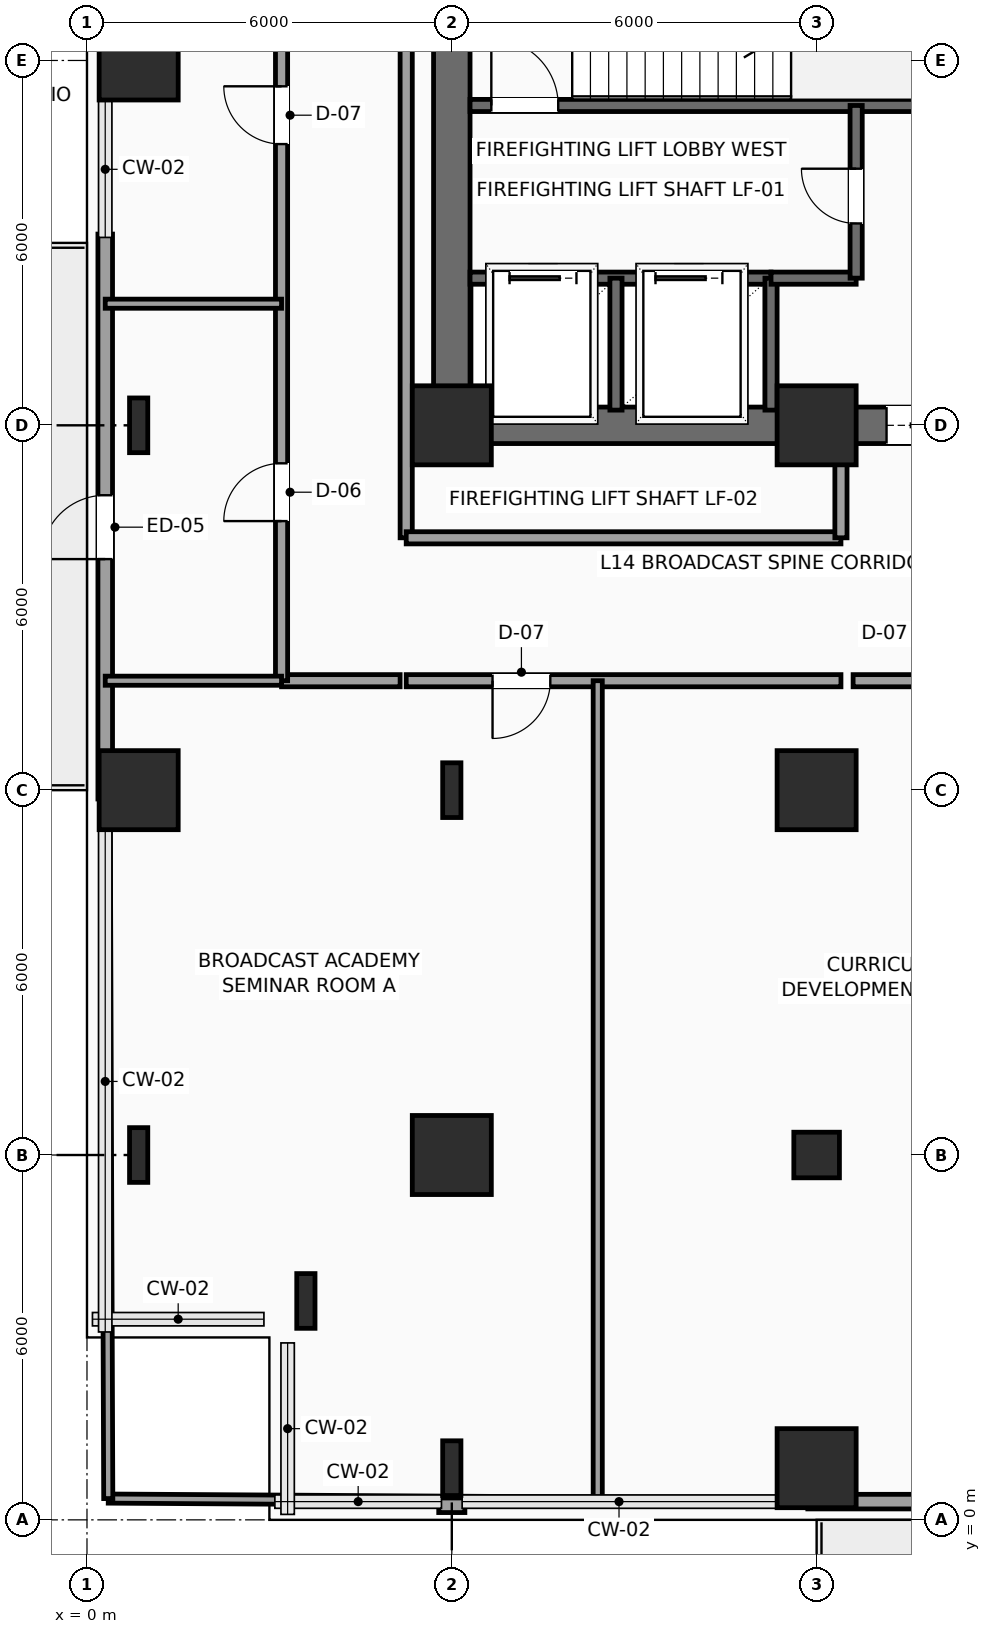
"""IFC4 building model, lengths in metres.
Left out: names, types, materials, properties, quantities, classifications, styles, units other than length and angle.
Written with IfcOpenShell. Run it as: python <this file> out.ifc"""

import sys

from ifc_helpers import new_model, si_unit, direction, frame, frame_2d, origin, origin_2d, place, context, subcontext, project, spatial, rectangle, hollow_rectangle, i_section, extrude, element, fill, save


model = new_model("IFC4")
c1 = context("Model", 3, precision=1e-05, world=origin(), true_north=direction((0.0, 1.0)))
c2 = subcontext(c1, "Body", "Model", "MODEL_VIEW")
j1 = project(units=[si_unit("LENGTHUNIT", "METRE"), si_unit("PLANEANGLEUNIT", "RADIAN")], contexts=[c1])
p1 = place(None, origin())
s1 = spatial("IfcSite", under=j1, at=p1, CompositionType="ELEMENT")
p2 = place(p1, origin())
s2 = spatial("IfcBuilding", under=s1, at=p2, CompositionType="ELEMENT")
p3 = place(p2, frame((0.0, 0.0, 63.6)))
s3 = spatial("IfcBuildingStorey", under=s2, at=p3, CompositionType="ELEMENT", Elevation=63.6)
for number, where, z_axis, x_axis in (
    (1, (6.0, 18.0, 0.0), (0.0, 0.0, 1.0), (1.0, 0.0, 0.0)),
    (2, (12.0, 18.0, 0.0), (0.0, 0.0, 1.0), (1.0, 0.0, 0.0)),
):
    element("IfcColumn", number, at=place(p3, frame(where, z_axis=z_axis, x_axis=x_axis)), inside=s3, PredefinedType="COLUMN", context=c2, shape_type="SweptSolid", body=[
        extrude(rectangle(XDim=1.3, YDim=1.3, at=origin_2d()), origin(), (0.0, 0.0, 1.0), 3.9),
    ])
for number, where, z_axis, x_axis in (
    (3, (3.6, 3.6, 0.0), (0.0, 0.0, 1.0), (1.0, 0.0, 0.0)),
    (4, (0.85, 6.0, 0.0), (0.0, 0.0, 1.0), (1.0, 0.0, 0.0)),
):
    element("IfcColumn", number, at=place(p3, frame(where, z_axis=z_axis, x_axis=x_axis)), inside=s3, PredefinedType="COLUMN", context=c2, shape_type="SweptSolid", body=[
        extrude(i_section(OverallWidth=0.3, OverallDepth=0.9, WebThickness=0.019, FlangeThickness=0.035, FilletRadius=0.03, at=origin_2d()), origin(), (0.0, 0.0, 1.0), 3.9),
    ])
p4 = place(p3, frame((0.85, 12.0, 0.0), z_axis=(0.0, 0.0, 1.0), x_axis=(1.0, 0.0, 0.0)))
e5 = element("IfcColumn", 5, at=p4, inside=s3, PredefinedType="COLUMN", context=c2, shape_type="SweptSolid", body=[
    extrude(rectangle(XDim=1.3, YDim=1.3, at=origin_2d()), origin(), (0.0, 0.0, 1.0), 3.9),
])
p5 = place(p3, frame((0.85, 18.0, 0.0), z_axis=(0.0, 0.0, 1.0), x_axis=(1.0, 0.0, 0.0)))
e6 = element("IfcColumn", 6, at=p5, inside=s3, PredefinedType="COLUMN", context=c2, shape_type="SweptSolid", body=[
    extrude(i_section(OverallWidth=0.3, OverallDepth=0.9, WebThickness=0.019, FlangeThickness=0.035, FilletRadius=0.03, at=origin_2d()), origin(), (0.0, 0.0, 1.0), 3.9),
])
p6 = place(p3, frame((0.85, 24.0, 0.0), z_axis=(0.0, 0.0, 1.0), x_axis=(1.0, 0.0, 0.0)))
e7 = element("IfcColumn", 7, at=p6, inside=s3, PredefinedType="COLUMN", context=c2, shape_type="SweptSolid", body=[
    extrude(rectangle(XDim=1.3, YDim=1.3, at=origin_2d()), origin(), (0.0, 0.0, 1.0), 3.9),
])
p7 = place(p3, frame((6.0, 0.85, 0.0), z_axis=(0.0, 0.0, 1.0), x_axis=(1.0, 0.0, 0.0)))
e8 = element("IfcColumn", 8, at=p7, inside=s3, PredefinedType="COLUMN", context=c2, shape_type="SweptSolid", body=[
    extrude(i_section(OverallWidth=0.3, OverallDepth=0.9, WebThickness=0.019, FlangeThickness=0.035, FilletRadius=0.03, at=origin_2d()), origin(), (0.0, 0.0, 1.0), 3.9),
])
p8 = place(p3, frame((6.0, 6.0, 0.0), z_axis=(0.0, 0.0, 1.0), x_axis=(1.0, 0.0, 0.0)))
e9 = element("IfcColumn", 9, at=p8, inside=s3, PredefinedType="COLUMN", context=c2, shape_type="SweptSolid", body=[
    extrude(rectangle(XDim=1.3, YDim=1.3, at=origin_2d()), origin(), (0.0, 0.0, 1.0), 3.9),
])
p9 = place(p3, frame((6.0, 12.0, 0.0), z_axis=(0.0, 0.0, 1.0), x_axis=(1.0, 0.0, 0.0)))
e10 = element("IfcColumn", 10, at=p9, inside=s3, PredefinedType="COLUMN", context=c2, shape_type="SweptSolid", body=[
    extrude(i_section(OverallWidth=0.3, OverallDepth=0.9, WebThickness=0.019, FlangeThickness=0.035, FilletRadius=0.03, at=origin_2d()), origin(), (0.0, 0.0, 1.0), 3.9),
])
p10 = place(p3, frame((12.0, 0.85, 0.0), z_axis=(0.0, 0.0, 1.0), x_axis=(1.0, 0.0, 0.0)))
e11 = element("IfcColumn", 11, at=p10, inside=s3, PredefinedType="COLUMN", context=c2, shape_type="SweptSolid", body=[
    extrude(rectangle(XDim=1.3, YDim=1.3, at=origin_2d()), origin(), (0.0, 0.0, 1.0), 3.9),
])
p11 = place(p3, frame((12.0, 6.0, 0.0), z_axis=(0.0, 0.0, 1.0), x_axis=(1.0, 0.0, 0.0)))
e12 = element("IfcColumn", 12, at=p11, inside=s3, PredefinedType="COLUMN", context=c2, shape_type="SweptSolid", body=[
    extrude(hollow_rectangle(XDim=0.75, YDim=0.75, WallThickness=0.035, InnerFilletRadius=0.035, OuterFilletRadius=0.05, at=origin_2d()), origin(), (0.0, 0.0, 1.0), 3.9),
])
p12 = place(p3, frame((12.0, 12.0, 0.0), z_axis=(0.0, 0.0, 1.0), x_axis=(1.0, 0.0, 0.0)))
e13 = element("IfcColumn", 13, at=p12, inside=s3, PredefinedType="COLUMN", context=c2, shape_type="SweptSolid", body=[
    extrude(rectangle(XDim=1.3, YDim=1.3, at=origin_2d()), origin(), (0.0, 0.0, 1.0), 3.9),
])
p13 = place(p3, frame((21.145, 0.3, 0.0), z_axis=(0.0, 0.0, 1.0), x_axis=(-1.0, 0.0, 0.0)))
e14 = element("IfcWall", 14, at=p13, inside=s3, PredefinedType="SOLIDWALL", context=c2, shape_type="SweptSolid", body=[
    extrude(rectangle(XDim=9.29, YDim=0.24, at=frame_2d((4.645, 0.0))), origin(), (0.0, 0.0, 1.0), 3.65),
])
p14 = place(p13, frame((5.95, 0.0, 0.0)))
e15 = element("IfcOpeningElement", 15, at=p14, cuts=e14, PredefinedType="OPENING", context=c2, shape_type="SweptSolid", body=[
    extrude(rectangle(XDim=1.05, YDim=2.2, at=frame_2d((0.525, 1.1))), frame((0.0, 0.13, 0.0), z_axis=(0.0, -1.0, 0.0), x_axis=(1.0, 0.0, 0.0)), (0.0, 0.0, 1.0), 0.26),
])
p15 = place(p3, frame((0.3, 11.855, 0.0), z_axis=(0.0, 0.0, 1.0), x_axis=(0.0, 1.0, 0.0)))
e16 = element("IfcWall", 16, at=p15, inside=s3, PredefinedType="SOLIDWALL", context=c2, shape_type="SweptSolid", body=[
    extrude(rectangle(XDim=9.29, YDim=0.24, at=frame_2d((4.645, 0.0))), origin(), (0.0, 0.0, 1.0), 3.65),
])
p16 = place(p15, frame((3.945, 0.0, 0.0)))
e17 = element("IfcOpeningElement", 17, at=p16, cuts=e16, PredefinedType="OPENING", context=c2, shape_type="SweptSolid", body=[
    extrude(rectangle(XDim=1.05, YDim=2.2, at=frame_2d((0.525, 1.1))), frame((0.0, 0.13, 0.0), z_axis=(0.0, -1.0, 0.0), x_axis=(1.0, 0.0, 0.0)), (0.0, 0.0, 1.0), 0.26),
])
p17 = place(p3, frame((6.215, 0.24, 0.0), z_axis=(0.0, 0.0, 1.0), x_axis=(-1.0, 0.0, 0.0)))
e18 = element("IfcWall", 18, at=p17, inside=s3, PredefinedType="SOLIDWALL", context=c2, shape_type="SweptSolid", body=[
    extrude(rectangle(XDim=0.43, YDim=0.24, at=frame_2d((0.215, 0.0))), origin(), (0.0, 0.0, 1.0), 3.65),
])
p18 = place(p3, frame((6.0, 18.0, 0.0), z_axis=(0.0, 0.0, 1.0), x_axis=(1.0, 0.0, 0.0)))
e19 = element("IfcWall", 19, at=p18, inside=s3, PredefinedType="SHEAR", context=c2, shape_type="SweptSolid", body=[
    extrude(rectangle(XDim=12.0, YDim=0.6, at=frame_2d((6.0, 0.0))), origin(), (0.0, 0.0, 1.0), 3.65),
])
p19 = place(p18, frame((7.15, 0.0, 0.0)))
e20 = element("IfcOpeningElement", 20, at=p19, cuts=e19, PredefinedType="OPENING", context=c2, shape_type="SweptSolid", body=[
    extrude(rectangle(XDim=1.6, YDim=2.3, at=frame_2d((0.8, 1.15))), frame((0.0, 0.31, 0.0), z_axis=(0.0, -1.0, 0.0), x_axis=(1.0, 0.0, 0.0)), (0.0, 0.0, 1.0), 0.62),
])
p20 = place(p3, frame((6.0, 18.0, 0.0), z_axis=(0.0, 0.0, 1.0), x_axis=(0.0, 1.0, 0.0)))
e21 = element("IfcWall", 21, at=p20, inside=s3, PredefinedType="SHEAR", context=c2, shape_type="SweptSolid", body=[
    extrude(rectangle(XDim=9.6, YDim=0.6, at=frame_2d((4.8, 0.0))), origin(), (0.0, 0.0, 1.0), 3.65),
])
p21 = place(p3, frame((6.3, 23.26, 0.0), z_axis=(0.0, 0.0, 1.0), x_axis=(1.0, 0.0, 0.0)))
e22 = element("IfcWall", 22, at=p21, inside=s3, PredefinedType="SHEAR", context=c2, shape_type="SweptSolid", body=[
    extrude(rectangle(XDim=8.88, YDim=0.2, at=frame_2d((4.44, 0.0))), origin(), (0.0, 0.0, 1.0), 3.65),
])
p22 = place(p21, frame((0.35, 0.0, 0.0)))
e23 = element("IfcOpeningElement", 23, at=p22, cuts=e22, PredefinedType="OPENING", context=c2, shape_type="SweptSolid", body=[
    extrude(rectangle(XDim=1.1, YDim=2.2, at=frame_2d((0.55, 1.1))), frame((0.0, 0.11, 0.0), z_axis=(0.0, -1.0, 0.0), x_axis=(1.0, 0.0, 0.0)), (0.0, 0.0, 1.0), 0.22),
])
p23 = place(p3, frame((6.3, 20.42, 0.0), z_axis=(0.0, 0.0, 1.0), x_axis=(1.0, 0.0, 0.0)))
e24 = element("IfcWall", 24, at=p23, inside=s3, PredefinedType="SHEAR", context=c2, shape_type="SweptSolid", body=[
    extrude(rectangle(XDim=4.95, YDim=0.2, at=frame_2d((2.475, 0.0))), origin(), (0.0, 0.0, 1.0), 3.65),
])
p24 = place(p23, frame((0.65, 0.0, 0.0)))
e25 = element("IfcOpeningElement", 25, at=p24, cuts=e24, PredefinedType="OPENING", context=c2, shape_type="SweptSolid", body=[
    extrude(rectangle(XDim=1.1, YDim=2.2, at=frame_2d((0.55, 1.1))), frame((0.0, 0.11, 0.0), z_axis=(0.0, -1.0, 0.0), x_axis=(1.0, 0.0, 0.0)), (0.0, 0.0, 1.0), 0.22),
])
p25 = place(p23, frame((3.05, 0.0, 0.0)))
e26 = element("IfcOpeningElement", 26, at=p25, cuts=e24, PredefinedType="OPENING", context=c2, shape_type="SweptSolid", body=[
    extrude(rectangle(XDim=1.1, YDim=2.2, at=frame_2d((0.55, 1.1))), frame((0.0, 0.11, 0.0), z_axis=(0.0, -1.0, 0.0), x_axis=(1.0, 0.0, 0.0)), (0.0, 0.0, 1.0), 0.22),
])
for number, where, z_axis, x_axis in (
    (27, (8.7, 18.25, 0.0), (0.0, 0.0, 1.0), (0.0, 1.0, 0.0)),
    (28, (11.25, 18.25, 0.0), (0.0, 0.0, 1.0), (0.0, 1.0, 0.0)),
):
    element("IfcWall", number, at=place(p3, frame(where, z_axis=z_axis, x_axis=x_axis)), inside=s3, PredefinedType="SHEAR", context=c2, shape_type="SweptSolid", body=[
        extrude(rectangle(XDim=2.17, YDim=0.2, at=frame_2d((1.085, 0.0))), origin(), (0.0, 0.0, 1.0), 3.65),
    ])
p26 = place(p3, frame((11.25, 20.42, 0.0), z_axis=(0.0, 0.0, 1.0), x_axis=(1.0, 0.0, 0.0)))
e29 = element("IfcWall", 29, at=p26, inside=s3, PredefinedType="SHEAR", context=c2, shape_type="SweptSolid", body=[
    extrude(rectangle(XDim=1.4, YDim=0.2, at=frame_2d((0.7, 0.0))), origin(), (0.0, 0.0, 1.0), 3.65),
])
p27 = place(p3, frame((12.65, 20.42, 0.0), z_axis=(0.0, 0.0, 1.0), x_axis=(0.0, 1.0, 0.0)))
e30 = element("IfcWall", 30, at=p27, inside=s3, PredefinedType="SHEAR", context=c2, shape_type="SweptSolid", body=[
    extrude(rectangle(XDim=2.84, YDim=0.2, at=frame_2d((1.42, 0.0))), origin(), (0.0, 0.0, 1.0), 3.65),
])
p28 = place(p27, frame((0.9, 0.0, 0.0)))
e31 = element("IfcOpeningElement", 31, at=p28, cuts=e30, PredefinedType="OPENING", context=c2, shape_type="SweptSolid", body=[
    extrude(rectangle(XDim=0.9, YDim=2.15, at=frame_2d((0.45, 1.075))), frame((0.0, 0.11, 0.0), z_axis=(0.0, -1.0, 0.0), x_axis=(1.0, 0.0, 0.0)), (0.0, 0.0, 1.0), 0.22),
])
p29 = place(p3, frame((21.55, 13.8, 0.0), z_axis=(0.0, 0.0, 1.0), x_axis=(-1.0, 0.0, 0.0)))
e32 = element("IfcWall", 32, at=p29, inside=s3, PredefinedType="SOLIDWALL", context=c2, shape_type="SweptSolid", body=[
    extrude(rectangle(XDim=8.95, YDim=0.2, at=frame_2d((4.475, 0.0))), origin(), (0.0, 0.0, 1.0), 3.65),
])
p30 = place(p29, frame((6.875, 0.0, 0.0)))
e33 = element("IfcOpeningElement", 33, at=p30, cuts=e32, PredefinedType="OPENING", context=c2, shape_type="SweptSolid", body=[
    extrude(rectangle(XDim=0.95, YDim=2.15, at=frame_2d((0.475, 1.075))), frame((0.0, 0.11, 0.0), z_axis=(0.0, -1.0, 0.0), x_axis=(1.0, 0.0, 0.0)), (0.0, 0.0, 1.0), 0.22),
])
p31 = place(p29, frame((1.93, 0.0, 0.0)))
e34 = element("IfcOpeningElement", 34, at=p31, cuts=e32, PredefinedType="OPENING", context=c2, shape_type="SweptSolid", body=[
    extrude(rectangle(XDim=0.95, YDim=2.15, at=frame_2d((0.475, 1.075))), frame((0.0, 0.11, 0.0), z_axis=(0.0, -1.0, 0.0), x_axis=(1.0, 0.0, 0.0)), (0.0, 0.0, 1.0), 0.22),
])
p32 = place(p3, frame((12.4, 13.8, 0.0), z_axis=(0.0, 0.0, 1.0), x_axis=(-1.0, 0.0, 0.0)))
e35 = element("IfcWall", 35, at=p32, inside=s3, PredefinedType="SOLIDWALL", context=c2, shape_type="SweptSolid", body=[
    extrude(rectangle(XDim=7.15, YDim=0.2, at=frame_2d((3.575, 0.0))), origin(), (0.0, 0.0, 1.0), 3.65),
])
p33 = place(p32, frame((4.78, 0.0, 0.0)))
e36 = element("IfcOpeningElement", 36, at=p33, cuts=e35, PredefinedType="OPENING", context=c2, shape_type="SweptSolid", body=[
    extrude(rectangle(XDim=0.95, YDim=2.15, at=frame_2d((0.475, 1.075))), frame((0.0, 0.11, 0.0), z_axis=(0.0, -1.0, 0.0), x_axis=(1.0, 0.0, 0.0)), (0.0, 0.0, 1.0), 0.22),
])
p34 = place(p3, frame((5.15, 13.8, 0.0), z_axis=(0.0, 0.0, 1.0), x_axis=(-1.0, 0.0, 0.0)))
e37 = element("IfcWall", 37, at=p34, inside=s3, PredefinedType="SOLIDWALL", context=c2, shape_type="SweptSolid", body=[
    extrude(rectangle(XDim=1.95, YDim=0.2, at=frame_2d((0.975, 0.0))), origin(), (0.0, 0.0, 1.0), 3.65),
])
p35 = place(p3, frame((3.2, 13.8, 0.0), z_axis=(0.0, 0.0, 1.0), x_axis=(0.0, 1.0, 0.0)))
e38 = element("IfcWall", 38, at=p35, inside=s3, PredefinedType="SOLIDWALL", context=c2, shape_type="SweptSolid", body=[
    extrude(rectangle(XDim=16.45, YDim=0.2, at=frame_2d((8.225, 0.0))), origin(), (0.0, 0.0, 1.0), 3.65),
])
p36 = place(p35, frame((2.625, 0.0, 0.0)))
e39 = element("IfcOpeningElement", 39, at=p36, cuts=e38, PredefinedType="OPENING", context=c2, shape_type="SweptSolid", body=[
    extrude(rectangle(XDim=0.95, YDim=2.15, at=frame_2d((0.475, 1.075))), frame((0.0, 0.11, 0.0), z_axis=(0.0, -1.0, 0.0), x_axis=(1.0, 0.0, 0.0)), (0.0, 0.0, 1.0), 0.22),
])
p37 = place(p35, frame((8.825, 0.0, 0.0)))
e40 = element("IfcOpeningElement", 40, at=p37, cuts=e38, PredefinedType="OPENING", context=c2, shape_type="SweptSolid", body=[
    extrude(rectangle(XDim=0.95, YDim=2.15, at=frame_2d((0.475, 1.075))), frame((0.0, 0.11, 0.0), z_axis=(0.0, -1.0, 0.0), x_axis=(1.0, 0.0, 0.0)), (0.0, 0.0, 1.0), 0.22),
])
p38 = place(p35, frame((13.95, 0.0, 0.0)))
e41 = element("IfcOpeningElement", 41, at=p38, cuts=e38, PredefinedType="OPENING", context=c2, shape_type="SweptSolid", body=[
    extrude(rectangle(XDim=0.95, YDim=2.15, at=frame_2d((0.475, 1.075))), frame((0.0, 0.11, 0.0), z_axis=(0.0, -1.0, 0.0), x_axis=(1.0, 0.0, 0.0)), (0.0, 0.0, 1.0), 0.22),
])
p39 = place(p3, frame((5.25, 30.25, 0.0), z_axis=(0.0, 0.0, 1.0), x_axis=(0.0, -1.0, 0.0)))
e42 = element("IfcWall", 42, at=p39, inside=s3, PredefinedType="SOLIDWALL", context=c2, shape_type="SweptSolid", body=[
    extrude(rectangle(XDim=14.1, YDim=0.2, at=frame_2d((7.05, 0.0))), origin(), (0.0, 0.0, 1.0), 3.65),
])
p40 = place(p3, frame((5.25, 16.15, 0.0), z_axis=(0.0, 0.0, 1.0), x_axis=(1.0, 0.0, 0.0)))
e43 = element("IfcWall", 43, at=p40, inside=s3, PredefinedType="SOLIDWALL", context=c2, shape_type="SweptSolid", body=[
    extrude(rectangle(XDim=7.15, YDim=0.2, at=frame_2d((3.575, 0.0))), origin(), (0.0, 0.0, 1.0), 3.65),
])
p41 = place(p3, frame((12.4, 16.15, 0.0), z_axis=(0.0, 0.0, 1.0), x_axis=(0.0, 1.0, 0.0)))
e44 = element("IfcWall", 44, at=p41, inside=s3, PredefinedType="SOLIDWALL", context=c2, shape_type="SweptSolid", body=[
    extrude(rectangle(XDim=1.8, YDim=0.2, at=frame_2d((0.9, 0.0))), origin(), (0.0, 0.0, 1.0), 3.65),
])
p42 = place(p3, frame((0.35, 0.35, 0.0), z_axis=(0.0, 0.0, 1.0), x_axis=(0.999980506152, -0.006243982317, 0.0)))
e45 = element("IfcWall", 45, at=p42, inside=s3, PredefinedType="PARTITIONING", context=c2, shape_type="SweptSolid", body=[
    extrude(rectangle(XDim=5.435, YDim=0.15, at=frame_2d((2.717, 0.0))), origin(), (0.0, 0.0, 1.0), 3.65),
])
p43 = place(p3, frame((6.215, 0.314, 0.0), z_axis=(0.0, 0.0, 1.0), x_axis=(0.99998042128, -0.006257559905, 0.0)))
e46 = element("IfcWall", 46, at=p43, inside=s3, PredefinedType="PARTITIONING", context=c2, shape_type="SweptSolid", body=[
    extrude(rectangle(XDim=2.185, YDim=0.15, at=frame_2d((1.092, 0.0))), origin(), (0.0, 0.0, 1.0), 3.65),
])
p44 = place(p3, frame((0.35, 0.35, 0.0), z_axis=(0.0, 0.0, 1.0), x_axis=(-0.003734801216, 0.999993025606, 0.0)))
e47 = element("IfcWall", 47, at=p44, inside=s3, PredefinedType="PARTITIONING", context=c2, shape_type="SweptSolid", body=[
    extrude(rectangle(XDim=11.505, YDim=0.15, at=frame_2d((5.752, 0.0))), origin(), (0.0, 0.0, 1.0), 3.65),
])
p45 = place(p3, frame((8.4, 0.3, 0.0), z_axis=(0.0, 0.0, 1.0), x_axis=(0.0, 1.0, 0.0)))
e48 = element("IfcWall", 48, at=p45, inside=s3, PredefinedType="PARTITIONING", context=c2, shape_type="SweptSolid", body=[
    extrude(rectangle(XDim=13.5, YDim=0.15, at=frame_2d((6.75, 0.0))), origin(), (0.0, 0.0, 1.0), 3.65),
])
for number, where, z_axis, x_axis in (
    (49, (0.3, 13.8, 0.0), (0.0, 0.0, 1.0), (1.0, 0.0, 0.0)),
    (50, (0.3, 20.0, 0.0), (0.0, 0.0, 1.0), (1.0, 0.0, 0.0)),
):
    element("IfcWall", number, at=place(p3, frame(where, z_axis=z_axis, x_axis=x_axis)), inside=s3, PredefinedType="PARTITIONING", context=c2, shape_type="SweptSolid", body=[
        extrude(rectangle(XDim=2.9, YDim=0.15, at=frame_2d((1.45, 0.0))), origin(), (0.0, 0.0, 1.0), 3.65),
    ])
p46 = place(p16, origin())
e51 = element("IfcDoor", 51, at=p46, inside=s3, OperationType="SINGLE_SWING_LEFT", PredefinedType="DOOR", context=c2, shape_type="SweptSolid", body=[
    extrude(rectangle(XDim=1.05, YDim=2.2, at=frame_2d((0.525, 1.1))), frame((0.0, 0.025, 0.0), z_axis=(0.0, -1.0, 0.0), x_axis=(1.0, 0.0, 0.0)), (0.0, 0.0, 1.0), 0.05),
])
fill(e17, e51)
p47 = place(p19, origin())
e52 = element("IfcDoor", 52, at=p47, inside=s3, OperationType="DOUBLE_DOOR_SLIDING", PredefinedType="DOOR", context=c2, shape_type="SweptSolid", body=[
    extrude(rectangle(XDim=1.6, YDim=2.3, at=frame_2d((0.8, 1.15))), frame((0.0, 0.025, 0.0), z_axis=(0.0, -1.0, 0.0), x_axis=(1.0, 0.0, 0.0)), (0.0, 0.0, 1.0), 0.05),
])
fill(e20, e52)
p48 = place(p22, origin())
e53 = element("IfcDoor", 53, at=p48, inside=s3, OperationType="SINGLE_SWING_LEFT", PredefinedType="DOOR", context=c2, shape_type="SweptSolid", body=[
    extrude(rectangle(XDim=1.1, YDim=2.2, at=frame_2d((0.55, 1.1))), frame((0.0, 0.025, 0.0), z_axis=(0.0, -1.0, 0.0), x_axis=(1.0, 0.0, 0.0)), (0.0, 0.0, 1.0), 0.05),
])
fill(e23, e53)
p49 = place(p24, origin())
e54 = element("IfcDoor", 54, at=p49, inside=s3, OperationType="SLIDING_TO_LEFT", PredefinedType="DOOR", context=c2, shape_type="SweptSolid", body=[
    extrude(rectangle(XDim=1.1, YDim=2.2, at=frame_2d((0.55, 1.1))), frame((0.0, 0.025, 0.0), z_axis=(0.0, -1.0, 0.0), x_axis=(1.0, 0.0, 0.0)), (0.0, 0.0, 1.0), 0.05),
])
fill(e25, e54)
p50 = place(p25, origin())
e55 = element("IfcDoor", 55, at=p50, inside=s3, OperationType="SLIDING_TO_LEFT", PredefinedType="DOOR", context=c2, shape_type="SweptSolid", body=[
    extrude(rectangle(XDim=1.1, YDim=2.2, at=frame_2d((0.55, 1.1))), frame((0.0, 0.025, 0.0), z_axis=(0.0, -1.0, 0.0), x_axis=(1.0, 0.0, 0.0)), (0.0, 0.0, 1.0), 0.05),
])
fill(e26, e55)
p51 = place(p28, origin())
e56 = element("IfcDoor", 56, at=p51, inside=s3, OperationType="SINGLE_SWING_RIGHT", PredefinedType="DOOR", context=c2, shape_type="SweptSolid", body=[
    extrude(rectangle(XDim=0.9, YDim=2.15, at=frame_2d((0.45, 1.075))), frame((0.0, 0.025, 0.0), z_axis=(0.0, -1.0, 0.0), x_axis=(1.0, 0.0, 0.0)), (0.0, 0.0, 1.0), 0.05),
])
fill(e31, e56)
p52 = place(p33, origin())
e57 = element("IfcDoor", 57, at=p52, inside=s3, OperationType="SINGLE_SWING_RIGHT", PredefinedType="DOOR", context=c2, shape_type="SweptSolid", body=[
    extrude(rectangle(XDim=0.95, YDim=2.15, at=frame_2d((0.475, 1.075))), frame((0.0, 0.025, 0.0), z_axis=(0.0, -1.0, 0.0), x_axis=(1.0, 0.0, 0.0)), (0.0, 0.0, 1.0), 0.05),
])
fill(e36, e57)
p53 = place(p36, origin())
e58 = element("IfcDoor", 58, at=p53, inside=s3, OperationType="SINGLE_SWING_LEFT", PredefinedType="DOOR", context=c2, shape_type="SweptSolid", body=[
    extrude(rectangle(XDim=0.95, YDim=2.15, at=frame_2d((0.475, 1.075))), frame((0.0, 0.025, 0.0), z_axis=(0.0, -1.0, 0.0), x_axis=(1.0, 0.0, 0.0)), (0.0, 0.0, 1.0), 0.05),
])
fill(e39, e58)
p54 = place(p37, origin())
e59 = element("IfcDoor", 59, at=p54, inside=s3, OperationType="SINGLE_SWING_RIGHT", PredefinedType="DOOR", context=c2, shape_type="SweptSolid", body=[
    extrude(rectangle(XDim=0.95, YDim=2.15, at=frame_2d((0.475, 1.075))), frame((0.0, 0.025, 0.0), z_axis=(0.0, -1.0, 0.0), x_axis=(1.0, 0.0, 0.0)), (0.0, 0.0, 1.0), 0.05),
])
fill(e40, e59)
save(model, sys.argv[1])
